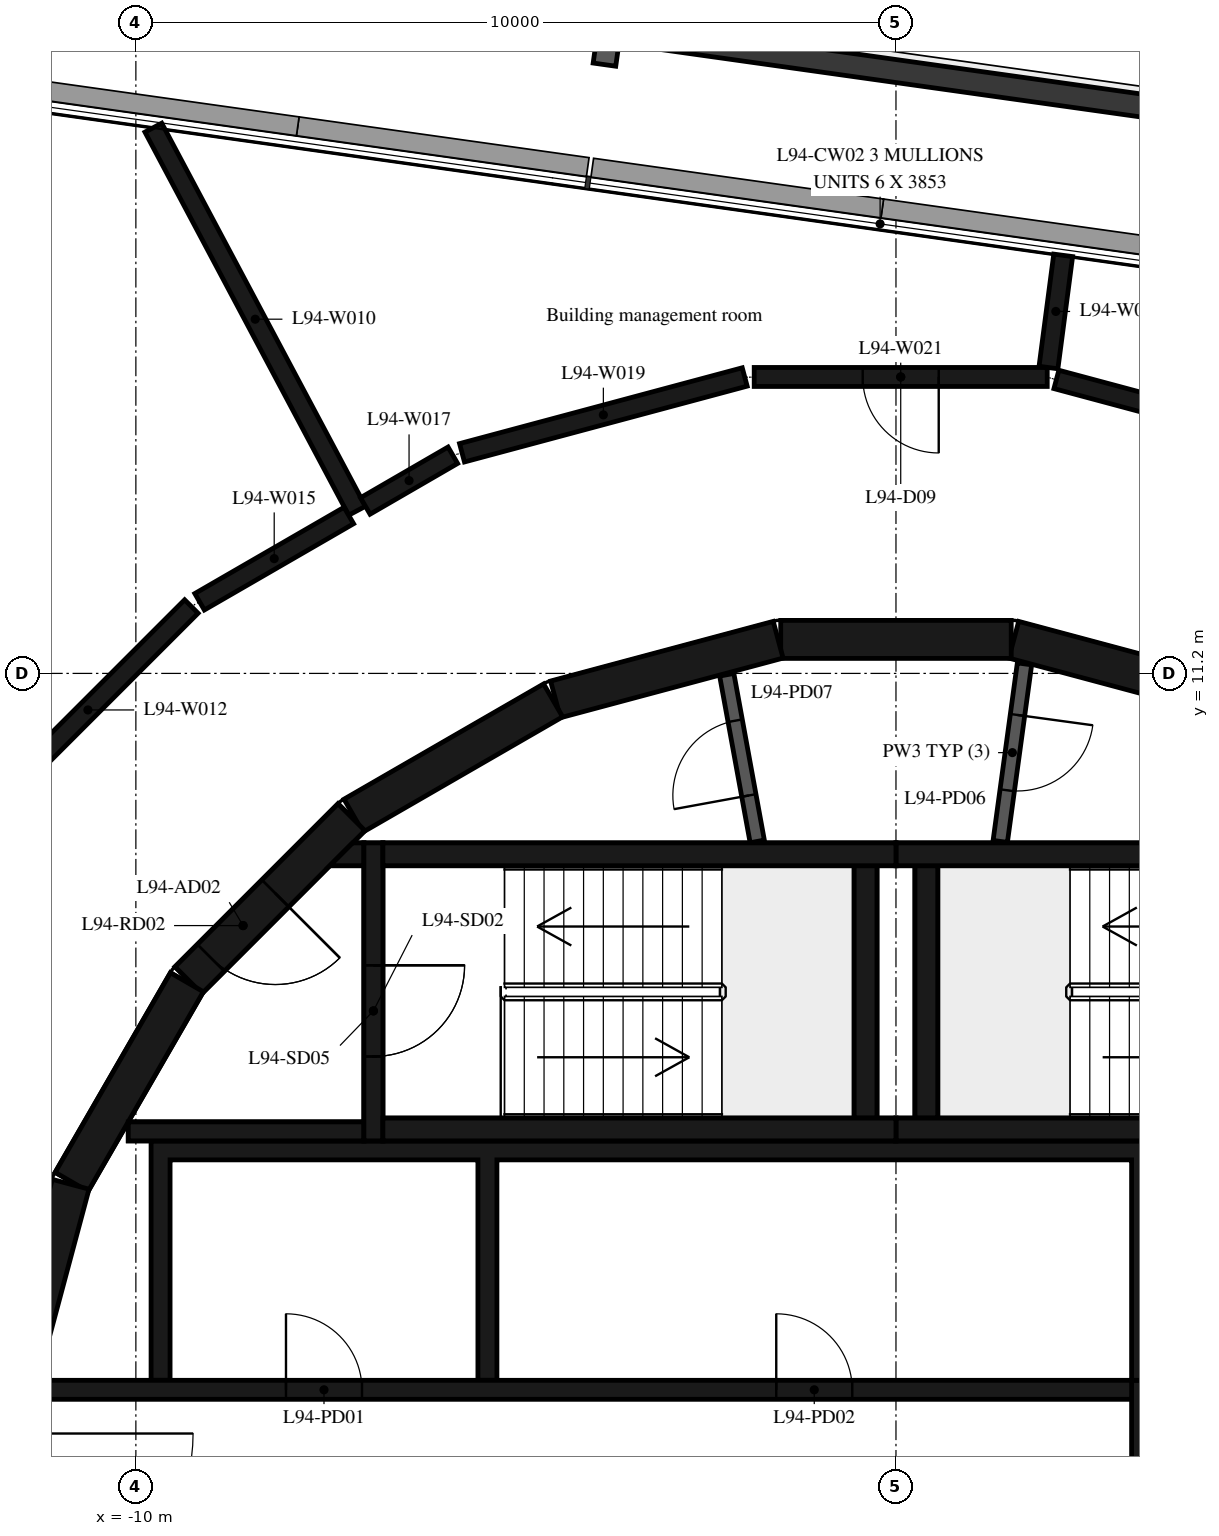
"""IFC4 building model, lengths in metres.
Left out: names, types, materials, properties, quantities, classifications, styles, units other than length and angle.
Written with IfcOpenShell. Run it as: python <this file> out.ifc"""

import sys

from ifc_helpers import new_model, si_unit, direction, frame, frame_2d, origin, origin_2d, place, context, subcontext, project, spatial, polyline, rectangle, i_section, outline, extrude, element, fill, save


model = new_model("IFC4")
c1 = context("Model", 3, precision=1e-05, world=origin(), true_north=direction((0.0, 1.0)))
c2 = subcontext(c1, "Body", "Model", "MODEL_VIEW")
j1 = project(units=[si_unit("LENGTHUNIT", "METRE"), si_unit("PLANEANGLEUNIT", "RADIAN")], contexts=[c1])
p1 = place(None, origin())
s1 = spatial("IfcSite", under=j1, at=p1, CompositionType="ELEMENT")
p2 = place(p1, origin())
s2 = spatial("IfcBuilding", under=s1, at=p2, CompositionType="ELEMENT")
p3 = place(p2, frame((0.0, 0.0, 366.2)))
s3 = spatial("IfcBuildingStorey", under=s2, at=p3, CompositionType="ELEMENT", Elevation=366.2)
p4 = place(p3, frame((-3.773, 19.655, -0.38), z_axis=(0.0, 0.0, 1.0), x_axis=(0.990268081324, -0.139173011432, 0.0)))
e1 = element("IfcColumn", 1, at=p4, inside=s3, PredefinedType="COLUMN", context=c2, shape_type="SweptSolid", body=[
    extrude(i_section(OverallWidth=0.3, OverallDepth=0.9, WebThickness=0.019, FlangeThickness=0.035, FilletRadius=0.03, at=origin_2d()), origin(), (0.0, 0.0, 1.0), 5.58),
])
p5 = place(p3, frame((3.769, 18.595, 5.2), z_axis=(0.0, 0.0, 1.0), x_axis=(-0.990271300098, 0.139150106731, 0.0)))
e2 = element("IfcWall", 2, at=p5, inside=s3, PredefinedType="PARAPET", context=c2, shape_type="SweptSolid", body=[
    extrude(rectangle(XDim=7.465, YDim=0.3, at=frame_2d((3.733, 0.0))), origin(), (0.0, 0.0, 1.0), 0.58),
])
for number, where, z_axis, x_axis in (
    (3, (4.479, 10.858, 0.0), (0.0, 0.0, 1.0), (-0.966, 0.259, 0.0)),
    (4, (1.516, 11.647, 0.0), (0.0, 0.0, 1.0), (-1.0, 0.0, 0.0)),
    (5, (-1.55, 11.643, 0.0), (0.0, 0.0, 1.0), (-0.966, -0.259, 0.0)),
    (6, (-4.51, 10.845, 0.0), (0.0, 0.0, 1.0), (-0.866, -0.5, 0.0)),
):
    element("IfcWall", number, at=place(p3, frame(where, z_axis=z_axis, x_axis=x_axis)), inside=s3, PredefinedType="SHEAR", context=c2, shape_type="SweptSolid", body=[
        extrude(rectangle(XDim=3.033, YDim=0.5, at=frame_2d((1.516, 0.0))), origin(), (0.0, 0.0, 1.0), 4.8),
    ])
p6 = place(p3, frame((-7.164, 9.308, 0.0), z_axis=(0.0, 0.0, 1.0), x_axis=(-0.707106781187, -0.707106781187, 0.0)))
e7 = element("IfcWall", 7, at=p6, inside=s3, PredefinedType="SHEAR", context=c2, shape_type="SweptSolid", body=[
    extrude(rectangle(XDim=3.032, YDim=0.5, at=frame_2d((1.516, 0.0))), origin(), (0.0, 0.0, 1.0), 4.8),
])
p7 = place(p6, frame((1.416, 0.0, 0.0)))
e8 = element("IfcOpeningElement", 8, at=p7, cuts=e7, PredefinedType="OPENING", context=c2, shape_type="SweptSolid", body=[
    extrude(rectangle(XDim=1.2, YDim=2.1, at=frame_2d((0.6, 1.05))), frame((0.0, 0.26, 0.0), z_axis=(0.0, -1.0, 0.0), x_axis=(1.0, 0.0, 0.0)), (0.0, 0.0, 1.0), 0.52),
])
for number, where, z_axis, x_axis in (
    (9, (-9.329, 7.137, 0.0), (0.0, 0.0, 1.0), (-0.5, -0.866, 0.0)),
    (10, (-10.858, 4.479, 0.0), (0.0, 0.0, 1.0), (-0.259, -0.966, 0.0)),
):
    element("IfcWall", number, at=place(p3, frame(where, z_axis=z_axis, x_axis=x_axis)), inside=s3, PredefinedType="SHEAR", context=c2, shape_type="SweptSolid", body=[
        extrude(rectangle(XDim=3.033, YDim=0.5, at=frame_2d((1.516, 0.0))), origin(), (0.0, 0.0, 1.0), 4.8),
    ])
for number, where, z_axis, x_axis in (
    (11, (0.0, 5.2, 0.0), (0.0, 0.0, 1.0), (1.0, 0.0, 0.0)),
    (12, (0.0, 8.82, 0.0), (0.0, 0.0, 1.0), (1.0, 0.0, 0.0)),
):
    element("IfcWall", number, at=place(p3, frame(where, z_axis=z_axis, x_axis=x_axis)), inside=s3, PredefinedType="SHEAR", context=c2, shape_type="SweptSolid", body=[
        extrude(rectangle(XDim=6.75, YDim=0.3, at=frame_2d((3.375, 0.0))), origin(), (0.0, 0.0, 1.0), 4.8),
    ])
p8 = place(p3, frame((0.4, 5.35, 0.0), z_axis=(0.0, 0.0, 1.0), x_axis=(0.0, 1.0, 0.0)))
e13 = element("IfcWall", 13, at=p8, inside=s3, PredefinedType="SHEAR", context=c2, shape_type="SweptSolid", body=[
    extrude(rectangle(XDim=3.32, YDim=0.3, at=frame_2d((1.66, 0.0))), origin(), (0.0, 0.0, 1.0), 4.8),
])
for number, where, z_axis, x_axis in (
    (14, (-6.75, 5.2, 0.0), (0.0, 0.0, 1.0), (1.0, 0.0, 0.0)),
    (15, (-6.75, 8.82, 0.0), (0.0, 0.0, 1.0), (1.0, 0.0, 0.0)),
):
    element("IfcWall", number, at=place(p3, frame(where, z_axis=z_axis, x_axis=x_axis)), inside=s3, PredefinedType="SHEAR", context=c2, shape_type="SweptSolid", body=[
        extrude(rectangle(XDim=6.75, YDim=0.3, at=frame_2d((3.375, 0.0))), origin(), (0.0, 0.0, 1.0), 4.8),
    ])
p9 = place(p3, frame((-0.4, 5.35, 0.0), z_axis=(0.0, 0.0, 1.0), x_axis=(0.0, 1.0, 0.0)))
e16 = element("IfcWall", 16, at=p9, inside=s3, PredefinedType="SHEAR", context=c2, shape_type="SweptSolid", body=[
    extrude(rectangle(XDim=3.32, YDim=0.3, at=frame_2d((1.66, 0.0))), origin(), (0.0, 0.0, 1.0), 4.8),
])
p10 = place(p3, frame((-6.875, 8.97, 0.0), z_axis=(0.0, 0.0, 1.0), x_axis=(0.0, -1.0, 0.0)))
e17 = element("IfcWall", 17, at=p10, inside=s3, PredefinedType="SHEAR", context=c2, shape_type="SweptSolid", body=[
    extrude(rectangle(XDim=3.92, YDim=0.25, at=frame_2d((1.96, 0.0))), origin(), (0.0, 0.0, 1.0), 4.8),
])
p11 = place(p10, frame((1.61, 0.0, 0.0)))
e18 = element("IfcOpeningElement", 18, at=p11, cuts=e17, PredefinedType="OPENING", context=c2, shape_type="SweptSolid", body=[
    extrude(rectangle(XDim=1.2, YDim=2.1, at=frame_2d((0.6, 1.05))), frame((0.0, 0.135, 0.0), z_axis=(0.0, -1.0, 0.0), x_axis=(1.0, 0.0, 0.0)), (0.0, 0.0, 1.0), 0.27),
])
p12 = place(p3, frame((-7.0, 5.175, 0.0), z_axis=(0.0, 0.0, 1.0), x_axis=(-1.0, 0.0, 0.0)))
e19 = element("IfcWall", 19, at=p12, inside=s3, PredefinedType="SHEAR", context=c2, shape_type="SweptSolid", body=[
    extrude(rectangle(XDim=3.1, YDim=0.25, at=frame_2d((1.55, 0.0))), origin(), (0.0, 0.0, 1.0), 4.8),
])
p13 = place(p3, origin())
e20 = element("IfcWall", 20, at=p13, inside=s3, PredefinedType="SHEAR", context=c2, shape_type="SweptSolid", body=[
    extrude(outline(polyline([(-7.148, 8.97), (-7.0, 8.97), (-7.0, 8.67), (-7.448, 8.67), (-7.148, 8.97)])), origin(), (0.0, 0.0, 1.0), 4.8),
])
p14 = place(p3, origin())
e21 = element("IfcWall", 21, at=p14, inside=s3, PredefinedType="SHEAR", context=c2, shape_type="SweptSolid", body=[
    extrude(outline(polyline([(-9.8, 1.9), (-9.55, 1.9), (-9.55, 4.8), (-5.5, 4.8), (-5.5, 1.9), (-5.25, 1.9), (-5.25, 4.8), (3.1, 4.8), (3.1, 1.9), (3.35, 1.9), (3.35, 4.8), (5.25, 4.8), (5.25, 1.9), (5.5, 1.9), (5.5, 4.8), (7.4, 4.8), (7.4, 1.9), (7.65, 1.9), (7.65, 4.8), (9.55, 4.8), (9.55, 1.9), (9.8, 1.9), (9.8, 4.8), (9.8, 5.05), (-9.8, 5.05), (-9.8, 4.8), (-9.8, 1.9)])), origin(), (0.0, 0.0, 1.0), 4.8),
])
p15 = place(p3, frame((-11.28, 1.775, 0.0), z_axis=(0.0, 0.0, 1.0), x_axis=(1.0, 0.0, 0.0)))
e22 = element("IfcWall", 22, at=p15, inside=s3, PredefinedType="SHEAR", context=c2, shape_type="SweptSolid", body=[
    extrude(rectangle(XDim=14.38, YDim=0.25, at=frame_2d((7.19, 0.0))), origin(), (0.0, 0.0, 1.0), 4.8),
])
p16 = place(p15, frame((3.255, 0.0, 0.0)))
e23 = element("IfcOpeningElement", 23, at=p16, cuts=e22, PredefinedType="OPENING", context=c2, shape_type="SweptSolid", body=[
    extrude(rectangle(XDim=1.0, YDim=2.4, at=frame_2d((0.5, 1.2))), frame((0.0, 0.135, 0.0), z_axis=(0.0, -1.0, 0.0), x_axis=(1.0, 0.0, 0.0)), (0.0, 0.0, 1.0), 0.27),
])
p17 = place(p15, frame((9.705, 0.0, 0.0)))
e24 = element("IfcOpeningElement", 24, at=p17, cuts=e22, PredefinedType="OPENING", context=c2, shape_type="SweptSolid", body=[
    extrude(rectangle(XDim=1.0, YDim=2.4, at=frame_2d((0.5, 1.2))), frame((0.0, 0.135, 0.0), z_axis=(0.0, -1.0, 0.0), x_axis=(1.0, 0.0, 0.0)), (0.0, 0.0, 1.0), 0.27),
])
p18 = place(p3, frame((3.225, -1.9, 0.0), z_axis=(0.0, 0.0, 1.0), x_axis=(0.0, 1.0, 0.0)))
e25 = element("IfcWall", 25, at=p18, inside=s3, PredefinedType="SHEAR", context=c2, shape_type="SweptSolid", body=[
    extrude(rectangle(XDim=3.8, YDim=0.25, at=frame_2d((1.9, 0.0))), origin(), (0.0, 0.0, 1.0), 4.8),
])
p19 = place(p3, frame((1.691, 11.326, 0.0), z_axis=(0.0, 0.0, 1.0), x_axis=(-0.135344253201, -0.990798633994, 0.0)))
e26 = element("IfcWall", 26, at=p19, inside=s3, PredefinedType="PARTITIONING", context=c2, shape_type="SweptSolid", body=[
    extrude(rectangle(XDim=2.358, YDim=0.19, at=frame_2d((1.179, 0.0))), origin(), (0.0, 0.0, 1.0), 4.8),
])
p20 = place(p19, frame((0.679, 0.0, 0.0)))
e27 = element("IfcOpeningElement", 27, at=p20, cuts=e26, PredefinedType="OPENING", context=c2, shape_type="SweptSolid", body=[
    extrude(rectangle(XDim=1.0, YDim=2.4, at=frame_2d((0.5, 1.2))), frame((0.0, 0.105, 0.0), z_axis=(0.0, -1.0, 0.0), x_axis=(1.0, 0.0, 0.0)), (0.0, 0.0, 1.0), 0.21),
])
p21 = place(p3, frame((-1.825, 8.99, 0.0), z_axis=(0.0, 0.0, 1.0), x_axis=(-0.179955206115, 0.983674805915, 0.0)))
e28 = element("IfcWall", 28, at=p21, inside=s3, PredefinedType="PARTITIONING", context=c2, shape_type="SweptSolid", body=[
    extrude(rectangle(XDim=2.229, YDim=0.19, at=frame_2d((1.115, 0.0))), origin(), (0.0, 0.0, 1.0), 4.8),
])
p22 = place(p21, frame((0.615, 0.0, 0.0)))
e29 = element("IfcOpeningElement", 29, at=p22, cuts=e28, PredefinedType="OPENING", context=c2, shape_type="SweptSolid", body=[
    extrude(rectangle(XDim=1.0, YDim=2.4, at=frame_2d((0.5, 1.2))), frame((0.0, 0.105, 0.0), z_axis=(0.0, -1.0, 0.0), x_axis=(1.0, 0.0, 0.0)), (0.0, 0.0, 1.0), 0.21),
])
for number, where, z_axis, x_axis in (
    (30, (0.0, 5.2, 5.2), (0.0, 0.0, 1.0), (1.0, 0.0, 0.0)),
    (31, (0.0, 8.82, 5.2), (0.0, 0.0, 1.0), (1.0, 0.0, 0.0)),
):
    element("IfcWall", number, at=place(p3, frame(where, z_axis=z_axis, x_axis=x_axis)), inside=s3, PredefinedType="SHEAR", context=c2, shape_type="SweptSolid", body=[
        extrude(rectangle(XDim=6.75, YDim=0.3, at=frame_2d((3.375, 0.0))), origin(), (0.0, 0.0, 1.0), 2.8),
    ])
p23 = place(p3, frame((0.4, 5.35, 5.2), z_axis=(0.0, 0.0, 1.0), x_axis=(0.0, 1.0, 0.0)))
e32 = element("IfcWall", 32, at=p23, inside=s3, PredefinedType="SHEAR", context=c2, shape_type="SweptSolid", body=[
    extrude(rectangle(XDim=3.32, YDim=0.3, at=frame_2d((1.66, 0.0))), origin(), (0.0, 0.0, 1.0), 2.8),
])
for number, where, z_axis, x_axis in (
    (33, (-6.75, 5.2, 5.2), (0.0, 0.0, 1.0), (1.0, 0.0, 0.0)),
    (34, (-6.75, 8.82, 5.2), (0.0, 0.0, 1.0), (1.0, 0.0, 0.0)),
):
    element("IfcWall", number, at=place(p3, frame(where, z_axis=z_axis, x_axis=x_axis)), inside=s3, PredefinedType="SHEAR", context=c2, shape_type="SweptSolid", body=[
        extrude(rectangle(XDim=6.75, YDim=0.3, at=frame_2d((3.375, 0.0))), origin(), (0.0, 0.0, 1.0), 2.8),
    ])
p24 = place(p3, frame((-0.4, 5.35, 5.2), z_axis=(0.0, 0.0, 1.0), x_axis=(0.0, 1.0, 0.0)))
e35 = element("IfcWall", 35, at=p24, inside=s3, PredefinedType="SHEAR", context=c2, shape_type="SweptSolid", body=[
    extrude(rectangle(XDim=3.32, YDim=0.3, at=frame_2d((1.66, 0.0))), origin(), (0.0, 0.0, 1.0), 2.8),
])
p25 = place(p3, frame((-6.875, 8.97, 5.2), z_axis=(0.0, 0.0, 1.0), x_axis=(0.0, -1.0, 0.0)))
e36 = element("IfcWall", 36, at=p25, inside=s3, PredefinedType="SHEAR", context=c2, shape_type="SweptSolid", body=[
    extrude(rectangle(XDim=3.92, YDim=0.25, at=frame_2d((1.96, 0.0))), origin(), (0.0, 0.0, 1.0), 2.8),
])
p26 = place(p25, frame((1.61, 0.0, 0.0)))
e37 = element("IfcOpeningElement", 37, at=p26, cuts=e36, PredefinedType="OPENING", context=c2, shape_type="SweptSolid", body=[
    extrude(rectangle(XDim=1.2, YDim=2.1, at=frame_2d((0.6, 1.05))), frame((0.0, 0.135, 0.0), z_axis=(0.0, -1.0, 0.0), x_axis=(1.0, 0.0, 0.0)), (0.0, 0.0, 1.0), 0.27),
])
p27 = place(p3, frame((-7.0, 5.175, 5.2), z_axis=(0.0, 0.0, 1.0), x_axis=(-1.0, 0.0, 0.0)))
e38 = element("IfcWall", 38, at=p27, inside=s3, PredefinedType="SHEAR", context=c2, shape_type="SweptSolid", body=[
    extrude(rectangle(XDim=3.1, YDim=0.25, at=frame_2d((1.55, 0.0))), origin(), (0.0, 0.0, 1.0), 2.8),
])
p28 = place(p3, frame((0.0, 0.0, 5.2)))
e39 = element("IfcWall", 39, at=p28, inside=s3, PredefinedType="SHEAR", context=c2, shape_type="SweptSolid", body=[
    extrude(outline(polyline([(-7.148, 8.97), (-7.0, 8.97), (-7.0, 8.67), (-7.448, 8.67), (-7.148, 8.97)])), origin(), (0.0, 0.0, 1.0), 2.8),
])
p29 = place(p3, frame((-9.329, 7.137, 5.2), z_axis=(0.0, 0.0, 1.0), x_axis=(-0.500087131594, -0.865975092491, 0.0)))
e40 = element("IfcWall", 40, at=p29, inside=s3, PredefinedType="SHEAR", context=c2, shape_type="SweptSolid", body=[
    extrude(rectangle(XDim=3.033, YDim=0.5, at=frame_2d((1.516, 0.0))), origin(), (0.0, 0.0, 1.0), 2.8),
])
p30 = place(p3, frame((-7.164, 9.308, 5.2), z_axis=(0.0, 0.0, 1.0), x_axis=(-0.707106781187, -0.707106781187, 0.0)))
e41 = element("IfcWall", 41, at=p30, inside=s3, PredefinedType="SHEAR", context=c2, shape_type="SweptSolid", body=[
    extrude(rectangle(XDim=3.032, YDim=0.5, at=frame_2d((1.516, 0.0))), origin(), (0.0, 0.0, 1.0), 2.8),
])
p31 = place(p30, frame((1.416, 0.0, 0.0)))
e42 = element("IfcOpeningElement", 42, at=p31, cuts=e41, PredefinedType="OPENING", context=c2, shape_type="SweptSolid", body=[
    extrude(rectangle(XDim=1.2, YDim=2.1, at=frame_2d((0.6, 1.05))), frame((0.0, 0.26, 0.0), z_axis=(0.0, -1.0, 0.0), x_axis=(1.0, 0.0, 0.0)), (0.0, 0.0, 1.0), 0.52),
])
p32 = place(p3, frame((-9.77, 18.38, 0.0), z_axis=(0.0, 0.0, 1.0), x_axis=(0.469502312853, -0.882931242072, 0.0)))
e43 = element("IfcWall", 43, at=p32, inside=s3, PredefinedType="PARTITIONING", context=c2, shape_type="SweptSolid", body=[
    extrude(rectangle(XDim=5.708, YDim=0.25, at=frame_2d((2.854, 0.0))), origin(), (0.0, 0.0, 1.0), 4.8),
])
p33 = place(p3, frame((-9.27, 12.08, 0.0), z_axis=(0.0, 0.0, 1.0), x_axis=(-0.707106781187, -0.707106781187, 0.0)))
e44 = element("IfcWall", 44, at=p33, inside=s3, PredefinedType="PARTITIONING", context=c2, shape_type="SweptSolid", body=[
    extrude(rectangle(XDim=3.849, YDim=0.25, at=frame_2d((1.925, 0.0))), origin(), (0.0, 0.0, 1.0), 4.8),
])
p34 = place(p3, frame((-7.198, 13.277, 0.0), z_axis=(0.0, 0.0, 1.0), x_axis=(-0.865821548015, -0.500352922439, 0.0)))
e45 = element("IfcWall", 45, at=p34, inside=s3, PredefinedType="PARTITIONING", context=c2, shape_type="SweptSolid", body=[
    extrude(rectangle(XDim=2.268, YDim=0.25, at=frame_2d((1.134, 0.0))), origin(), (0.0, 0.0, 1.0), 4.8),
])
p35 = place(p3, frame((-5.83, 14.07, 0.0), z_axis=(0.0, 0.0, 1.0), x_axis=(-0.865225325987, -0.501383221968, 0.0)))
e46 = element("IfcWall", 46, at=p35, inside=s3, PredefinedType="PARTITIONING", context=c2, shape_type="SweptSolid", body=[
    extrude(rectangle(XDim=1.331, YDim=0.25, at=frame_2d((0.666, 0.0))), origin(), (0.0, 0.0, 1.0), 4.8),
])
p36 = place(p3, frame((-1.99, 15.1, 0.0), z_axis=(0.0, 0.0, 1.0), x_axis=(-0.965845546311, -0.259118468411, 0.0)))
e47 = element("IfcWall", 47, at=p36, inside=s3, PredefinedType="PARTITIONING", context=c2, shape_type="SweptSolid", body=[
    extrude(rectangle(XDim=3.851, YDim=0.25, at=frame_2d((1.925, 0.0))), origin(), (0.0, 0.0, 1.0), 4.8),
])
p37 = place(p3, frame((1.99, 15.1, 0.0), z_axis=(0.0, 0.0, 1.0), x_axis=(-1.0, 0.0, 0.0)))
e48 = element("IfcWall", 48, at=p37, inside=s3, PredefinedType="PARTITIONING", context=c2, shape_type="SweptSolid", body=[
    extrude(rectangle(XDim=3.855, YDim=0.25, at=frame_2d((1.927, 0.0))), origin(), (0.0, 0.0, 1.0), 4.8),
])
p38 = place(p37, frame((1.427, 0.0, 0.0)))
e49 = element("IfcOpeningElement", 49, at=p38, cuts=e48, PredefinedType="OPENING", context=c2, shape_type="SweptSolid", body=[
    extrude(rectangle(XDim=1.0, YDim=2.1, at=frame_2d((0.5, 1.05))), frame((0.0, 0.135, 0.0), z_axis=(0.0, -1.0, 0.0), x_axis=(1.0, 0.0, 0.0)), (0.0, 0.0, 1.0), 0.27),
])
p39 = place(p3, frame((2.006, 15.224, 0.0), z_axis=(0.0, 0.0, 1.0), x_axis=(0.13004725163, 0.991507797419, 0.0)))
e50 = element("IfcWall", 50, at=p39, inside=s3, PredefinedType="PARTITIONING", context=c2, shape_type="SweptSolid", body=[
    extrude(rectangle(XDim=1.489, YDim=0.25, at=frame_2d((0.744, 0.0))), origin(), (0.0, 0.0, 1.0), 4.8),
])
p40 = place(p3, frame((5.83, 14.07, 0.0), z_axis=(0.0, 0.0, 1.0), x_axis=(-0.965861411942, 0.259059323171, 0.0)))
e51 = element("IfcWall", 51, at=p40, inside=s3, PredefinedType="PARTITIONING", context=c2, shape_type="SweptSolid", body=[
    extrude(rectangle(XDim=3.851, YDim=0.25, at=frame_2d((1.925, 0.0))), origin(), (0.0, 0.0, 1.0), 4.8),
])
p41 = place(p40, frame((1.425, 0.0, 0.0)))
e52 = element("IfcOpeningElement", 52, at=p41, cuts=e51, PredefinedType="OPENING", context=c2, shape_type="SweptSolid", body=[
    extrude(rectangle(XDim=1.0, YDim=2.1, at=frame_2d((0.5, 1.05))), frame((0.0, 0.135, 0.0), z_axis=(0.0, -1.0, 0.0), x_axis=(1.0, 0.0, 0.0)), (0.0, 0.0, 1.0), 0.27),
])
p42 = place(p11, origin())
e53 = element("IfcDoor", 53, at=p42, inside=s3, OperationType="SINGLE_SWING_LEFT", PredefinedType="DOOR", context=c2, shape_type="SweptSolid", body=[
    extrude(rectangle(XDim=1.2, YDim=2.1, at=frame_2d((0.6, 1.05))), frame((0.0, 0.025, 0.0), z_axis=(0.0, -1.0, 0.0), x_axis=(1.0, 0.0, 0.0)), (0.0, 0.0, 1.0), 0.05),
])
fill(e18, e53)
p43 = place(p7, origin())
e54 = element("IfcDoor", 54, at=p43, inside=s3, OperationType="SINGLE_SWING_RIGHT", PredefinedType="DOOR", context=c2, shape_type="SweptSolid", body=[
    extrude(rectangle(XDim=1.2, YDim=2.1, at=frame_2d((0.6, 1.05))), frame((0.0, 0.025, 0.0), z_axis=(0.0, -1.0, 0.0), x_axis=(1.0, 0.0, 0.0)), (0.0, 0.0, 1.0), 0.05),
])
fill(e8, e54)
p44 = place(p16, origin())
e55 = element("IfcDoor", 55, at=p44, inside=s3, OperationType="SINGLE_SWING_RIGHT", PredefinedType="DOOR", context=c2, shape_type="SweptSolid", body=[
    extrude(rectangle(XDim=1.0, YDim=2.4, at=frame_2d((0.5, 1.2))), frame((0.0, 0.025, 0.0), z_axis=(0.0, -1.0, 0.0), x_axis=(1.0, 0.0, 0.0)), (0.0, 0.0, 1.0), 0.05),
])
fill(e23, e55)
p45 = place(p17, origin())
e56 = element("IfcDoor", 56, at=p45, inside=s3, OperationType="SINGLE_SWING_LEFT", PredefinedType="DOOR", context=c2, shape_type="SweptSolid", body=[
    extrude(rectangle(XDim=1.0, YDim=2.4, at=frame_2d((0.5, 1.2))), frame((0.0, 0.025, 0.0), z_axis=(0.0, -1.0, 0.0), x_axis=(1.0, 0.0, 0.0)), (0.0, 0.0, 1.0), 0.05),
])
fill(e24, e56)
p46 = place(p20, origin())
e57 = element("IfcDoor", 57, at=p46, inside=s3, OperationType="SINGLE_SWING_LEFT", PredefinedType="DOOR", context=c2, shape_type="SweptSolid", body=[
    extrude(rectangle(XDim=1.0, YDim=2.4, at=frame_2d((0.5, 1.2))), frame((0.0, 0.025, 0.0), z_axis=(0.0, -1.0, 0.0), x_axis=(1.0, 0.0, 0.0)), (0.0, 0.0, 1.0), 0.05),
])
fill(e27, e57)
p47 = place(p22, origin())
e58 = element("IfcDoor", 58, at=p47, inside=s3, OperationType="SINGLE_SWING_RIGHT", PredefinedType="DOOR", context=c2, shape_type="SweptSolid", body=[
    extrude(rectangle(XDim=1.0, YDim=2.4, at=frame_2d((0.5, 1.2))), frame((0.0, 0.025, 0.0), z_axis=(0.0, -1.0, 0.0), x_axis=(1.0, 0.0, 0.0)), (0.0, 0.0, 1.0), 0.05),
])
fill(e29, e58)
p48 = place(p26, origin())
e59 = element("IfcDoor", 59, at=p48, inside=s3, OperationType="SINGLE_SWING_RIGHT", PredefinedType="DOOR", context=c2, shape_type="SweptSolid", body=[
    extrude(rectangle(XDim=1.2, YDim=2.1, at=frame_2d((0.6, 1.05))), frame((0.0, 0.025, 0.0), z_axis=(0.0, -1.0, 0.0), x_axis=(1.0, 0.0, 0.0)), (0.0, 0.0, 1.0), 0.05),
])
fill(e37, e59)
p49 = place(p31, origin())
e60 = element("IfcDoor", 60, at=p49, inside=s3, OperationType="SINGLE_SWING_LEFT", PredefinedType="DOOR", context=c2, shape_type="SweptSolid", body=[
    extrude(rectangle(XDim=1.2, YDim=2.1, at=frame_2d((0.6, 1.05))), frame((0.0, 0.025, 0.0), z_axis=(0.0, -1.0, 0.0), x_axis=(1.0, 0.0, 0.0)), (0.0, 0.0, 1.0), 0.05),
])
fill(e42, e60)
p50 = place(p38, origin())
e61 = element("IfcDoor", 61, at=p50, inside=s3, OperationType="SINGLE_SWING_LEFT", PredefinedType="DOOR", context=c2, shape_type="SweptSolid", body=[
    extrude(rectangle(XDim=1.0, YDim=2.1, at=frame_2d((0.5, 1.05))), frame((0.0, 0.025, 0.0), z_axis=(0.0, -1.0, 0.0), x_axis=(1.0, 0.0, 0.0)), (0.0, 0.0, 1.0), 0.05),
])
fill(e49, e61)
save(model, sys.argv[1])
